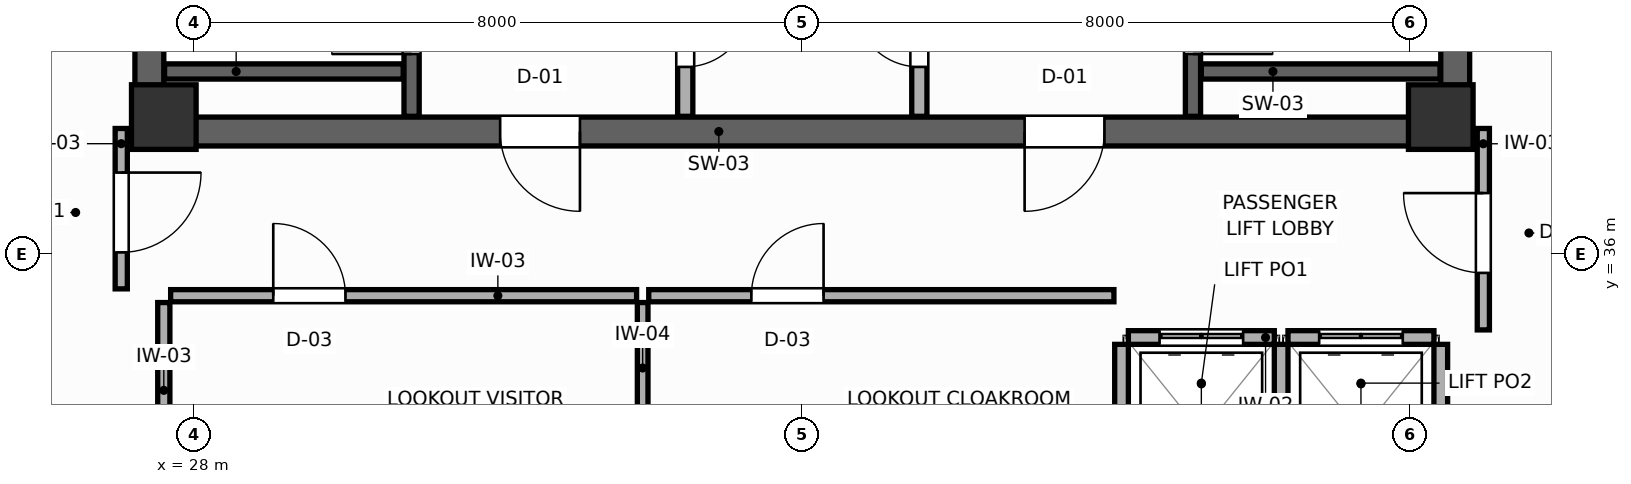
"""IFC4 building model, lengths in metres.
Left out: names, types, materials, properties, quantities, classifications, styles, units other than length and angle.
Written with IfcOpenShell. Run it as: python <this file> out.ifc"""

import sys

from ifc_helpers import new_model, si_unit, direction, frame, frame_2d, origin, origin_2d, place, context, subcontext, project, spatial, rectangle, extrude, source, transform, mapped, element, fill, save


model = new_model("IFC4")
c1 = context("Model", 3, precision=1e-05, world=origin(), true_north=direction((0.0, 1.0)))
c2 = subcontext(c1, "Body", "Model", "MODEL_VIEW")
j1 = project(units=[si_unit("LENGTHUNIT", "METRE"), si_unit("PLANEANGLEUNIT", "RADIAN")], contexts=[c1])
p1 = place(None, origin())
s1 = spatial("IfcSite", under=j1, at=p1, CompositionType="ELEMENT")
p2 = place(p1, origin())
s2 = spatial("IfcBuilding", under=s1, at=p2, CompositionType="ELEMENT")
p3 = place(p2, frame((0.0, 0.0, 283.8)))
s3 = spatial("IfcBuildingStorey", under=s2, at=p3, CompositionType="ELEMENT", Elevation=283.8)
p4 = place(p3, frame((27.22, 37.61, 0.0), z_axis=(0.0, 0.0, 1.0), x_axis=(1.0, 0.0, 0.0)))
e1 = element("IfcWall", 1, at=p4, inside=s3, PredefinedType="SHEAR", context=c2, shape_type="SweptSolid", body=[
    extrude(rectangle(XDim=17.56, YDim=0.38, at=frame_2d((8.78, 0.0))), origin(), (0.0, 0.0, 1.0), 4.2),
])
p5 = place(p4, frame((4.805, 0.0, 0.0)))
e2 = element("IfcOpeningElement", 2, at=p5, cuts=e1, PredefinedType="OPENING", context=c2, shape_type="SweptSolid", body=[
    extrude(rectangle(XDim=1.05, YDim=2.1, at=frame_2d((0.525, 1.05))), frame((0.0, 0.2, 0.0), z_axis=(0.0, -1.0, 0.0), x_axis=(1.0, 0.0, 0.0)), (0.0, 0.0, 1.0), 0.4),
])
p6 = place(p4, frame((11.705, 0.0, 0.0)))
e3 = element("IfcOpeningElement", 3, at=p6, cuts=e1, PredefinedType="OPENING", context=c2, shape_type="SweptSolid", body=[
    extrude(rectangle(XDim=1.05, YDim=2.1, at=frame_2d((0.525, 1.05))), frame((0.0, 0.2, 0.0), z_axis=(0.0, -1.0, 0.0), x_axis=(1.0, 0.0, 0.0)), (0.0, 0.0, 1.0), 0.4),
])
for number, where, z_axis, x_axis in (
    (4, (27.41, 37.8, 0.0), (0.0, 0.0, 1.0), (0.0, 1.0, 0.0)),
    (5, (44.59, 37.8, 0.0), (0.0, 0.0, 1.0), (0.0, 1.0, 0.0)),
):
    element("IfcWall", number, at=place(p3, frame(where, z_axis=z_axis, x_axis=x_axis)), inside=s3, PredefinedType="SHEAR", context=c2, shape_type="SweptSolid", body=[
        extrude(rectangle(XDim=9.0, YDim=0.38, at=frame_2d((4.5, 0.0))), origin(), (0.0, 0.0, 1.0), 4.2),
    ])
m1 = source(origin(), c2, "Body", "SweptSolid", [
    extrude(rectangle(XDim=0.85, YDim=0.85, at=origin_2d()), origin(), (0.0, 0.0, 1.0), 4.2),
])
for number, where, z_axis, x_axis in (
    (6, (27.6, 37.8, 0.0), (0.0, 0.0, 1.0), (1.0, 0.0, 0.0)),
    (7, (44.4, 37.8, 0.0), (0.0, 0.0, 1.0), (1.0, 0.0, 0.0)),
):
    element("IfcColumn", number, at=place(p3, frame(where, z_axis=z_axis, x_axis=x_axis)), inside=s3, PredefinedType="COLUMN", context=c2, shape_type="MappedRepresentation", body=[
        mapped(m1, transform((0.0, 0.0, 0.0), scale=1.0)),
    ])
p7 = place(p3, frame((30.86, 37.81, 0.0), z_axis=(0.0, 0.0, 1.0), x_axis=(0.0, 1.0, 0.0)))
e8 = element("IfcWall", 8, at=p7, inside=s3, PredefinedType="SHEAR", context=c2, shape_type="SweptSolid", body=[
    extrude(rectangle(XDim=8.98, YDim=0.2, at=frame_2d((4.49, 0.0))), origin(), (0.0, 0.0, 1.0), 4.2),
])
p8 = place(p7, frame((0.82, 0.0, 0.0)))
e9 = element("IfcOpeningElement", 9, at=p8, cuts=e8, PredefinedType="OPENING", context=c2, shape_type="SweptSolid", body=[
    extrude(rectangle(XDim=1.05, YDim=2.1, at=frame_2d((0.525, 1.05))), frame((0.0, 0.11, 0.0), z_axis=(0.0, -1.0, 0.0), x_axis=(1.0, 0.0, 0.0)), (0.0, 0.0, 1.0), 0.22),
])
p9 = place(p3, frame((27.61, 38.4, 0.0), z_axis=(0.0, 0.0, 1.0), x_axis=(1.0, 0.0, 0.0)))
e10 = element("IfcWall", 10, at=p9, inside=s3, PredefinedType="SHEAR", context=c2, shape_type="SweptSolid", body=[
    extrude(rectangle(XDim=3.14, YDim=0.2, at=frame_2d((1.57, 0.0))), origin(), (0.0, 0.0, 1.0), 4.2),
])
p10 = place(p3, frame((41.14, 37.81, 0.0), z_axis=(0.0, 0.0, 1.0), x_axis=(0.0, 1.0, 0.0)))
e11 = element("IfcWall", 11, at=p10, inside=s3, PredefinedType="SHEAR", context=c2, shape_type="SweptSolid", body=[
    extrude(rectangle(XDim=8.98, YDim=0.2, at=frame_2d((4.49, 0.0))), origin(), (0.0, 0.0, 1.0), 4.2),
])
p11 = place(p10, frame((0.82, 0.0, 0.0)))
e12 = element("IfcOpeningElement", 12, at=p11, cuts=e11, PredefinedType="OPENING", context=c2, shape_type="SweptSolid", body=[
    extrude(rectangle(XDim=1.05, YDim=2.1, at=frame_2d((0.525, 1.05))), frame((0.0, 0.11, 0.0), z_axis=(0.0, -1.0, 0.0), x_axis=(1.0, 0.0, 0.0)), (0.0, 0.0, 1.0), 0.22),
])
p12 = place(p3, frame((41.25, 38.4, 0.0), z_axis=(0.0, 0.0, 1.0), x_axis=(1.0, 0.0, 0.0)))
e13 = element("IfcWall", 13, at=p12, inside=s3, PredefinedType="SHEAR", context=c2, shape_type="SweptSolid", body=[
    extrude(rectangle(XDim=3.14, YDim=0.2, at=frame_2d((1.57, 0.0))), origin(), (0.0, 0.0, 1.0), 4.2),
])
p13 = place(p3, frame((34.46, 37.81, 0.0), z_axis=(0.0, 0.0, 1.0), x_axis=(0.0, 1.0, 0.0)))
e14 = element("IfcWall", 14, at=p13, inside=s3, PredefinedType="PARTITIONING", context=c2, shape_type="SweptSolid", body=[
    extrude(rectangle(XDim=8.98, YDim=0.2, at=frame_2d((4.49, 0.0))), origin(), (0.0, 0.0, 1.0), 3.96),
])
p14 = place(p13, frame((0.65, 0.0, 0.0)))
e15 = element("IfcOpeningElement", 15, at=p14, cuts=e14, PredefinedType="OPENING", context=c2, shape_type="SweptSolid", body=[
    extrude(rectangle(XDim=0.85, YDim=2.05, at=frame_2d((0.425, 1.025))), frame((0.0, 0.11, 0.0), z_axis=(0.0, -1.0, 0.0), x_axis=(1.0, 0.0, 0.0)), (0.0, 0.0, 1.0), 0.22),
])
p15 = place(p3, frame((37.54, 37.81, 0.0), z_axis=(0.0, 0.0, 1.0), x_axis=(0.0, 1.0, 0.0)))
e16 = element("IfcWall", 16, at=p15, inside=s3, PredefinedType="PARTITIONING", context=c2, shape_type="SweptSolid", body=[
    extrude(rectangle(XDim=8.98, YDim=0.2, at=frame_2d((4.49, 0.0))), origin(), (0.0, 0.0, 1.0), 3.96),
])
p16 = place(p15, frame((0.65, 0.0, 0.0)))
e17 = element("IfcOpeningElement", 17, at=p16, cuts=e16, PredefinedType="OPENING", context=c2, shape_type="SweptSolid", body=[
    extrude(rectangle(XDim=0.85, YDim=2.05, at=frame_2d((0.425, 1.025))), frame((0.0, 0.11, 0.0), z_axis=(0.0, -1.0, 0.0), x_axis=(1.0, 0.0, 0.0)), (0.0, 0.0, 1.0), 0.22),
])
p17 = place(p3, frame((40.29, 34.9, 0.0), z_axis=(0.0, 0.0, 1.0), x_axis=(1.0, 0.0, 0.0)))
e18 = element("IfcWall", 18, at=p17, inside=s3, PredefinedType="PARTITIONING", context=c2, shape_type="SweptSolid", body=[
    extrude(rectangle(XDim=1.92, YDim=0.18, at=frame_2d((0.96, 0.0))), origin(), (0.0, 0.0, 1.0), 3.96),
])
p18 = place(p17, frame((0.41, 0.0, 0.0)))
e19 = element("IfcOpeningElement", 19, at=p18, cuts=e18, PredefinedType="OPENING", context=c2, shape_type="SweptSolid", body=[
    extrude(rectangle(XDim=1.1, YDim=2.1, at=frame_2d((0.55, 1.05))), frame((0.0, 0.1, 0.0), z_axis=(0.0, -1.0, 0.0), x_axis=(1.0, 0.0, 0.0)), (0.0, 0.0, 1.0), 0.2),
])
p19 = place(p3, frame((40.2, 32.49, 0.0), z_axis=(0.0, 0.0, 1.0), x_axis=(0.0, 1.0, 0.0)))
e20 = element("IfcWall", 20, at=p19, inside=s3, PredefinedType="PARTITIONING", context=c2, shape_type="SweptSolid", body=[
    extrude(rectangle(XDim=2.32, YDim=0.18, at=frame_2d((1.16, 0.0))), origin(), (0.0, 0.0, 1.0), 3.96),
])
p20 = place(p3, frame((42.39, 34.9, 0.0), z_axis=(0.0, 0.0, 1.0), x_axis=(1.0, 0.0, 0.0)))
e21 = element("IfcWall", 21, at=p20, inside=s3, PredefinedType="PARTITIONING", context=c2, shape_type="SweptSolid", body=[
    extrude(rectangle(XDim=1.92, YDim=0.18, at=frame_2d((0.96, 0.0))), origin(), (0.0, 0.0, 1.0), 3.96),
])
p21 = place(p20, frame((0.41, 0.0, 0.0)))
e22 = element("IfcOpeningElement", 22, at=p21, cuts=e21, PredefinedType="OPENING", context=c2, shape_type="SweptSolid", body=[
    extrude(rectangle(XDim=1.1, YDim=2.1, at=frame_2d((0.55, 1.05))), frame((0.0, 0.1, 0.0), z_axis=(0.0, -1.0, 0.0), x_axis=(1.0, 0.0, 0.0)), (0.0, 0.0, 1.0), 0.2),
])
for number, where, z_axis, x_axis in (
    (23, (42.3, 32.49, 0.0), (0.0, 0.0, 1.0), (0.0, 1.0, 0.0)),
    (24, (44.4, 32.49, 0.0), (0.0, 0.0, 1.0), (0.0, 1.0, 0.0)),
):
    element("IfcWall", number, at=place(p3, frame(where, z_axis=z_axis, x_axis=x_axis)), inside=s3, PredefinedType="PARTITIONING", context=c2, shape_type="SweptSolid", body=[
        extrude(rectangle(XDim=2.32, YDim=0.18, at=frame_2d((1.16, 0.0))), origin(), (0.0, 0.0, 1.0), 3.96),
    ])
p22 = place(p3, frame((27.6, 33.05, 0.0), z_axis=(0.0, 0.0, 1.0), x_axis=(0.0, 1.0, 0.0)))
e25 = element("IfcWall", 25, at=p22, inside=s3, PredefinedType="PARTITIONING", context=c2, shape_type="SweptSolid", body=[
    extrude(rectangle(XDim=2.31, YDim=0.16, at=frame_2d((1.155, 0.0))), origin(), (0.0, 0.0, 1.0), 3.96),
])
p23 = place(p3, frame((33.9, 32.49, 0.0), z_axis=(0.0, 0.0, 1.0), x_axis=(0.0, 1.0, 0.0)))
e26 = element("IfcWall", 26, at=p23, inside=s3, PredefinedType="PARTITIONING", context=c2, shape_type="SweptSolid", body=[
    extrude(rectangle(XDim=2.87, YDim=0.14, at=frame_2d((1.435, 0.0))), origin(), (0.0, 0.0, 1.0), 3.96),
])
p24 = place(p3, frame((27.69, 35.45, 0.0), z_axis=(0.0, 0.0, 1.0), x_axis=(1.0, 0.0, 0.0)))
e27 = element("IfcWall", 27, at=p24, inside=s3, PredefinedType="PARTITIONING", context=c2, shape_type="SweptSolid", body=[
    extrude(rectangle(XDim=6.13, YDim=0.16, at=frame_2d((3.065, 0.0))), origin(), (0.0, 0.0, 1.0), 3.96),
])
p25 = place(p24, frame((1.35, 0.0, 0.0)))
e28 = element("IfcOpeningElement", 28, at=p25, cuts=e27, PredefinedType="OPENING", context=c2, shape_type="SweptSolid", body=[
    extrude(rectangle(XDim=0.95, YDim=2.05, at=frame_2d((0.475, 1.025))), frame((0.0, 0.09, 0.0), z_axis=(0.0, -1.0, 0.0), x_axis=(1.0, 0.0, 0.0)), (0.0, 0.0, 1.0), 0.18),
])
p26 = place(p3, frame((33.98, 35.45, 0.0), z_axis=(0.0, 0.0, 1.0), x_axis=(1.0, 0.0, 0.0)))
e29 = element("IfcWall", 29, at=p26, inside=s3, PredefinedType="PARTITIONING", context=c2, shape_type="SweptSolid", body=[
    extrude(rectangle(XDim=6.12, YDim=0.16, at=frame_2d((3.06, 0.0))), origin(), (0.0, 0.0, 1.0), 3.96),
])
p27 = place(p26, frame((1.35, 0.0, 0.0)))
e30 = element("IfcOpeningElement", 30, at=p27, cuts=e29, PredefinedType="OPENING", context=c2, shape_type="SweptSolid", body=[
    extrude(rectangle(XDim=0.95, YDim=2.05, at=frame_2d((0.475, 1.025))), frame((0.0, 0.09, 0.0), z_axis=(0.0, -1.0, 0.0), x_axis=(1.0, 0.0, 0.0)), (0.0, 0.0, 1.0), 0.18),
])
p28 = place(p3, frame((27.04, 35.54, 0.0), z_axis=(0.0, 0.0, 1.0), x_axis=(0.0, 1.0, 0.0)))
e31 = element("IfcWall", 31, at=p28, inside=s3, PredefinedType="PARTITIONING", context=c2, shape_type="SweptSolid", body=[
    extrude(rectangle(XDim=2.11, YDim=0.16, at=frame_2d((1.055, 0.0))), origin(), (0.0, 0.0, 1.0), 3.96),
])
p29 = place(p28, frame((0.48, 0.0, 0.0)))
e32 = element("IfcOpeningElement", 32, at=p29, cuts=e31, PredefinedType="OPENING", context=c2, shape_type="SweptSolid", body=[
    extrude(rectangle(XDim=1.05, YDim=2.1, at=frame_2d((0.525, 1.05))), frame((0.0, 0.09, 0.0), z_axis=(0.0, -1.0, 0.0), x_axis=(1.0, 0.0, 0.0)), (0.0, 0.0, 1.0), 0.18),
])
p30 = place(p3, frame((44.96, 35.0, 0.0), z_axis=(0.0, 0.0, 1.0), x_axis=(0.0, 1.0, 0.0)))
e33 = element("IfcWall", 33, at=p30, inside=s3, PredefinedType="PARTITIONING", context=c2, shape_type="SweptSolid", body=[
    extrude(rectangle(XDim=2.65, YDim=0.16, at=frame_2d((1.325, 0.0))), origin(), (0.0, 0.0, 1.0), 3.96),
])
p31 = place(p30, frame((0.75, 0.0, 0.0)))
e34 = element("IfcOpeningElement", 34, at=p31, cuts=e33, PredefinedType="OPENING", context=c2, shape_type="SweptSolid", body=[
    extrude(rectangle(XDim=1.05, YDim=2.1, at=frame_2d((0.525, 1.05))), frame((0.0, 0.09, 0.0), z_axis=(0.0, -1.0, 0.0), x_axis=(1.0, 0.0, 0.0)), (0.0, 0.0, 1.0), 0.18),
])
p32 = place(p8, origin())
e35 = element("IfcDoor", 35, at=p32, inside=s3, OperationType="SINGLE_SWING_LEFT", PredefinedType="DOOR", context=c2, shape_type="SweptSolid", body=[
    extrude(rectangle(XDim=1.05, YDim=2.1, at=frame_2d((0.525, 1.05))), frame((0.0, 0.025, 0.0), z_axis=(0.0, -1.0, 0.0), x_axis=(1.0, 0.0, 0.0)), (0.0, 0.0, 1.0), 0.05),
])
fill(e9, e35)
p33 = place(p11, frame((1.05, 0.0, 0.0), z_axis=(0.0, 0.0, 1.0), x_axis=(-1.0, 0.0, 0.0)))
e36 = element("IfcDoor", 36, at=p33, inside=s3, OperationType="SINGLE_SWING_RIGHT", PredefinedType="DOOR", context=c2, shape_type="SweptSolid", body=[
    extrude(rectangle(XDim=1.05, YDim=2.1, at=frame_2d((0.525, 1.05))), frame((0.0, 0.025, 0.0), z_axis=(0.0, -1.0, 0.0), x_axis=(1.0, 0.0, 0.0)), (0.0, 0.0, 1.0), 0.05),
])
fill(e12, e36)
p34 = place(p14, frame((0.85, 0.0, 0.0), z_axis=(0.0, 0.0, 1.0), x_axis=(-1.0, 0.0, 0.0)))
e37 = element("IfcDoor", 37, at=p34, inside=s3, OperationType="SINGLE_SWING_LEFT", PredefinedType="DOOR", context=c2, shape_type="SweptSolid", body=[
    extrude(rectangle(XDim=0.85, YDim=2.05, at=frame_2d((0.425, 1.025))), frame((0.0, 0.025, 0.0), z_axis=(0.0, -1.0, 0.0), x_axis=(1.0, 0.0, 0.0)), (0.0, 0.0, 1.0), 0.05),
])
fill(e15, e37)
p35 = place(p16, origin())
e38 = element("IfcDoor", 38, at=p35, inside=s3, OperationType="SINGLE_SWING_RIGHT", PredefinedType="DOOR", context=c2, shape_type="SweptSolid", body=[
    extrude(rectangle(XDim=0.85, YDim=2.05, at=frame_2d((0.425, 1.025))), frame((0.0, 0.025, 0.0), z_axis=(0.0, -1.0, 0.0), x_axis=(1.0, 0.0, 0.0)), (0.0, 0.0, 1.0), 0.05),
])
fill(e17, e38)
p36 = place(p18, origin())
e39 = element("IfcDoor", 39, at=p36, inside=s3, OperationType="DOUBLE_DOOR_SLIDING", PredefinedType="DOOR", context=c2, shape_type="SweptSolid", body=[
    extrude(rectangle(XDim=1.1, YDim=2.1, at=frame_2d((0.55, 1.05))), frame((0.0, 0.025, 0.0), z_axis=(0.0, -1.0, 0.0), x_axis=(1.0, 0.0, 0.0)), (0.0, 0.0, 1.0), 0.05),
])
fill(e19, e39)
p37 = place(p21, origin())
e40 = element("IfcDoor", 40, at=p37, inside=s3, OperationType="DOUBLE_DOOR_SLIDING", PredefinedType="DOOR", context=c2, shape_type="SweptSolid", body=[
    extrude(rectangle(XDim=1.1, YDim=2.1, at=frame_2d((0.55, 1.05))), frame((0.0, 0.025, 0.0), z_axis=(0.0, -1.0, 0.0), x_axis=(1.0, 0.0, 0.0)), (0.0, 0.0, 1.0), 0.05),
])
fill(e22, e40)
p38 = place(p25, origin())
e41 = element("IfcDoor", 41, at=p38, inside=s3, OperationType="SINGLE_SWING_LEFT", PredefinedType="DOOR", context=c2, shape_type="SweptSolid", body=[
    extrude(rectangle(XDim=0.95, YDim=2.05, at=frame_2d((0.475, 1.025))), frame((0.0, 0.025, 0.0), z_axis=(0.0, -1.0, 0.0), x_axis=(1.0, 0.0, 0.0)), (0.0, 0.0, 1.0), 0.05),
])
fill(e28, e41)
p39 = place(p27, origin())
e42 = element("IfcDoor", 42, at=p39, inside=s3, OperationType="SINGLE_SWING_RIGHT", PredefinedType="DOOR", context=c2, shape_type="SweptSolid", body=[
    extrude(rectangle(XDim=0.95, YDim=2.05, at=frame_2d((0.475, 1.025))), frame((0.0, 0.025, 0.0), z_axis=(0.0, -1.0, 0.0), x_axis=(1.0, 0.0, 0.0)), (0.0, 0.0, 1.0), 0.05),
])
fill(e30, e42)
p40 = place(p29, frame((1.05, 0.0, 0.0), z_axis=(0.0, 0.0, 1.0), x_axis=(-1.0, 0.0, 0.0)))
e43 = element("IfcDoor", 43, at=p40, inside=s3, OperationType="SINGLE_SWING_LEFT", PredefinedType="DOOR", context=c2, shape_type="SweptSolid", body=[
    extrude(rectangle(XDim=1.05, YDim=2.1, at=frame_2d((0.525, 1.05))), frame((0.0, 0.025, 0.0), z_axis=(0.0, -1.0, 0.0), x_axis=(1.0, 0.0, 0.0)), (0.0, 0.0, 1.0), 0.05),
])
fill(e32, e43)
p41 = place(p31, origin())
e44 = element("IfcDoor", 44, at=p41, inside=s3, OperationType="SINGLE_SWING_RIGHT", PredefinedType="DOOR", context=c2, shape_type="SweptSolid", body=[
    extrude(rectangle(XDim=1.05, YDim=2.1, at=frame_2d((0.525, 1.05))), frame((0.0, 0.025, 0.0), z_axis=(0.0, -1.0, 0.0), x_axis=(1.0, 0.0, 0.0)), (0.0, 0.0, 1.0), 0.05),
])
fill(e34, e44)
p42 = place(p5, frame((1.05, 0.0, 0.0), z_axis=(0.0, 0.0, 1.0), x_axis=(-1.0, 0.0, 0.0)))
e45 = element("IfcDoor", 45, at=p42, inside=s3, OperationType="SINGLE_SWING_LEFT", PredefinedType="DOOR", context=c2, shape_type="SweptSolid", body=[
    extrude(rectangle(XDim=1.05, YDim=2.1, at=frame_2d((0.525, 1.05))), frame((0.0, 0.025, 0.0), z_axis=(0.0, -1.0, 0.0), x_axis=(1.0, 0.0, 0.0)), (0.0, 0.0, 1.0), 0.05),
])
fill(e2, e45)
p43 = place(p6, frame((1.05, 0.0, 0.0), z_axis=(0.0, 0.0, 1.0), x_axis=(-1.0, 0.0, 0.0)))
e46 = element("IfcDoor", 46, at=p43, inside=s3, OperationType="SINGLE_SWING_RIGHT", PredefinedType="DOOR", context=c2, shape_type="SweptSolid", body=[
    extrude(rectangle(XDim=1.05, YDim=2.1, at=frame_2d((0.525, 1.05))), frame((0.0, 0.025, 0.0), z_axis=(0.0, -1.0, 0.0), x_axis=(1.0, 0.0, 0.0)), (0.0, 0.0, 1.0), 0.05),
])
fill(e3, e46)
save(model, sys.argv[1])
